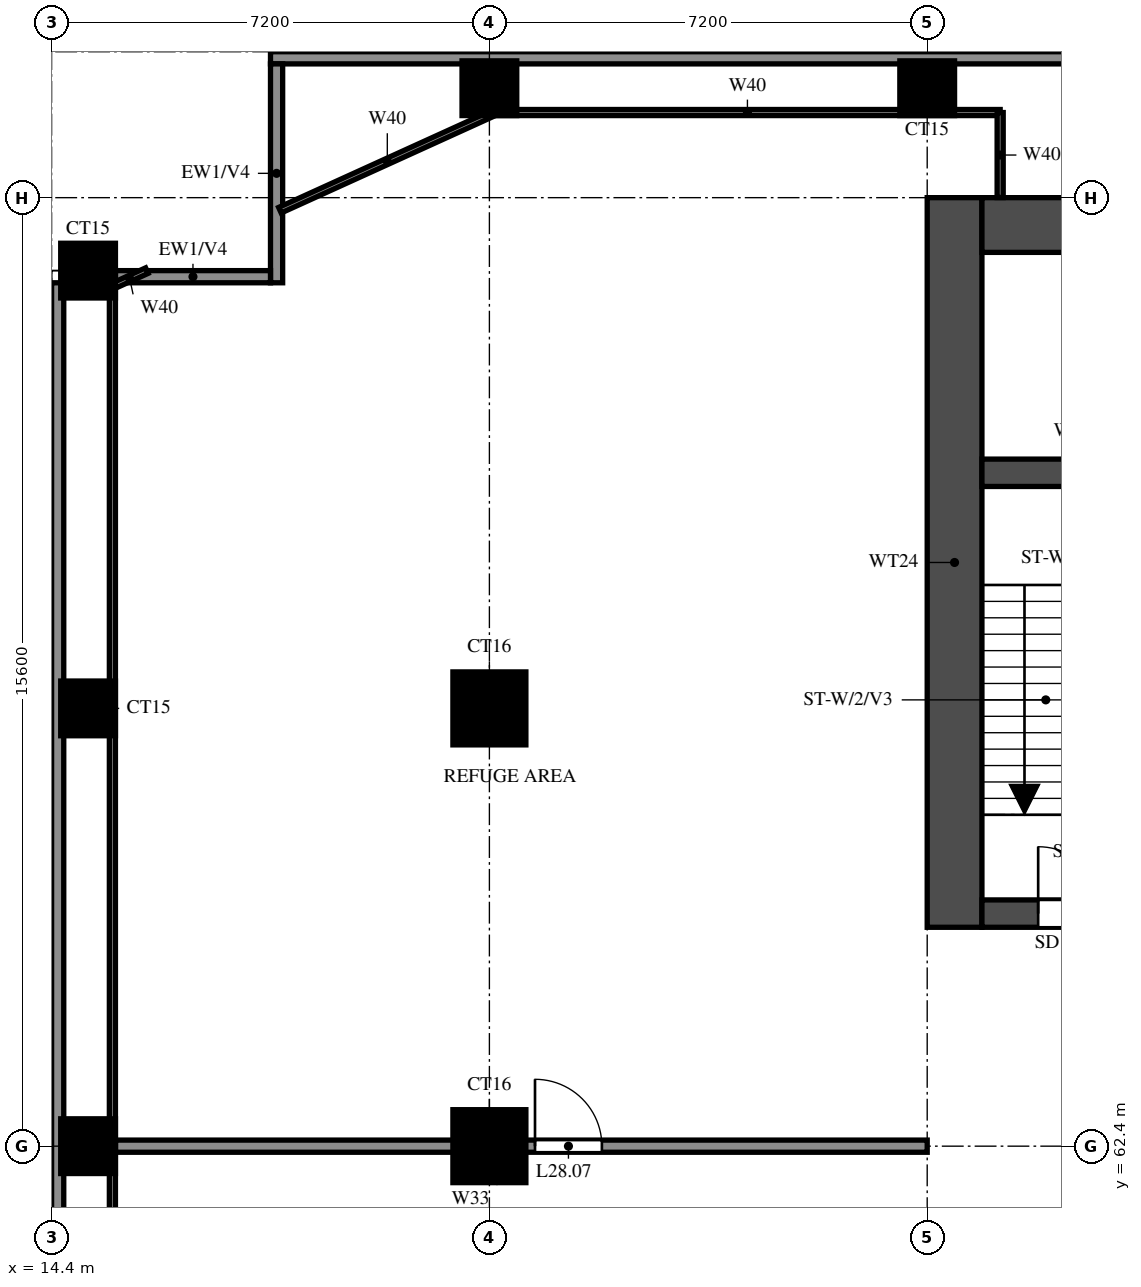
"""IFC4 building model, lengths in metres.
Left out: names, types, materials, properties, quantities, classifications, styles, units other than length and angle.
Written with IfcOpenShell. Run it as: python <this file> out.ifc"""

import sys

from ifc_helpers import new_model, si_unit, direction, frame, frame_2d, origin, origin_2d, place, context, subcontext, project, spatial, rectangle, extrude, source, transform, mapped, element, fill, save


model = new_model("IFC4")
c1 = context("Model", 3, precision=1e-05, world=origin(), true_north=direction((0.0, 1.0)))
c2 = subcontext(c1, "Body", "Model", "MODEL_VIEW")
j1 = project(units=[si_unit("LENGTHUNIT", "METRE"), si_unit("PLANEANGLEUNIT", "RADIAN")], contexts=[c1])
p1 = place(None, origin())
s1 = spatial("IfcSite", under=j1, at=p1, CompositionType="ELEMENT")
p2 = place(p1, origin())
s2 = spatial("IfcBuilding", under=s1, at=p2, CompositionType="ELEMENT")
p3 = place(p2, frame((0.0, 0.0, 107.5)))
s3 = spatial("IfcBuildingStorey", under=s2, at=p3, CompositionType="ELEMENT", Elevation=107.5)
m1 = source(origin(), c2, "Body", "SweptSolid", [
    extrude(rectangle(XDim=0.9, YDim=0.9, at=origin_2d()), origin(), (0.0, 0.0, 1.0), 5.2),
])
p4 = place(p3, frame((15.0, 62.4, 0.0), z_axis=(0.0, 0.0, 1.0), x_axis=(1.0, 0.0, 0.0)))
e1 = element("IfcColumn", 1, at=p4, inside=s3, PredefinedType="COLUMN", context=c2, shape_type="MappedRepresentation", body=[
    mapped(m1, transform((0.0, 0.0, 0.0))),
])
m2 = source(origin(), c2, "Body", "SweptSolid", [
    extrude(rectangle(XDim=1.2, YDim=1.2, at=origin_2d()), origin(), (0.0, 0.0, 1.0), 5.2),
])
p5 = place(p3, frame((21.6, 62.4, 0.0), z_axis=(0.0, 0.0, 1.0), x_axis=(1.0, 0.0, 0.0)))
e2 = element("IfcColumn", 2, at=p5, inside=s3, PredefinedType="COLUMN", context=c2, shape_type="MappedRepresentation", body=[
    mapped(m2, transform((0.0, 0.0, 0.0))),
])
p6 = place(p3, frame((15.0, 69.6, 0.0), z_axis=(0.0, 0.0, 1.0), x_axis=(1.0, 0.0, 0.0)))
e3 = element("IfcColumn", 3, at=p6, inside=s3, PredefinedType="COLUMN", context=c2, shape_type="MappedRepresentation", body=[
    mapped(m1, transform((0.0, 0.0, 0.0))),
])
p7 = place(p3, frame((21.6, 69.6, 0.0), z_axis=(0.0, 0.0, 1.0), x_axis=(1.0, 0.0, 0.0)))
e4 = element("IfcColumn", 4, at=p7, inside=s3, PredefinedType="COLUMN", context=c2, shape_type="MappedRepresentation", body=[
    mapped(m2, transform((0.0, 0.0, 0.0))),
])
for number, where, z_axis, x_axis in (
    (5, (15.0, 76.8, 0.0), (0.0, 0.0, 1.0), (1.0, 0.0, 0.0)),
    (6, (21.6, 79.8, 0.0), (0.0, 0.0, 1.0), (1.0, 0.0, 0.0)),
    (7, (28.8, 79.8, 0.0), (0.0, 0.0, 1.0), (1.0, 0.0, 0.0)),
):
    element("IfcColumn", number, at=place(p3, frame(where, z_axis=z_axis, x_axis=x_axis)), inside=s3, PredefinedType="COLUMN", context=c2, shape_type="MappedRepresentation", body=[
        mapped(m1, transform((0.0, 0.0, 0.0))),
    ])
p8 = place(p3, frame((29.25, 66.0, 0.0), z_axis=(0.0, 0.0, 1.0), x_axis=(0.0, 1.0, 0.0)))
e8 = element("IfcWall", 8, at=p8, inside=s3, PredefinedType="SHEAR", context=c2, shape_type="SweptSolid", body=[
    extrude(rectangle(XDim=12.0, YDim=0.9, at=frame_2d((6.0, 0.0))), origin(), (0.0, 0.0, 1.0), 5.2),
])
p9 = place(p3, frame((29.7, 77.55, 0.0), z_axis=(0.0, 0.0, 1.0), x_axis=(1.0, 0.0, 0.0)))
e9 = element("IfcWall", 9, at=p9, inside=s3, PredefinedType="SHEAR", context=c2, shape_type="SweptSolid", body=[
    extrude(rectangle(XDim=41.4, YDim=0.9, at=frame_2d((20.7, 0.0))), origin(), (0.0, 0.0, 1.0), 5.2),
])
p10 = place(p3, frame((29.7, 66.225, 0.0), z_axis=(0.0, 0.0, 1.0), x_axis=(1.0, 0.0, 0.0)))
e10 = element("IfcWall", 10, at=p10, inside=s3, PredefinedType="SHEAR", context=c2, shape_type="SweptSolid", body=[
    extrude(rectangle(XDim=41.4, YDim=0.45, at=frame_2d((20.7, 0.0))), origin(), (0.0, 0.0, 1.0), 5.2),
])
p11 = place(p10, frame((0.925, 0.0, 0.0)))
e11 = element("IfcOpeningElement", 11, at=p11, cuts=e10, PredefinedType="OPENING", context=c2, shape_type="SweptSolid", body=[
    extrude(rectangle(XDim=1.1, YDim=2.1, at=frame_2d((0.55, 1.05))), frame((0.0, 0.235, 0.0), z_axis=(0.0, -1.0, 0.0), x_axis=(1.0, 0.0, 0.0)), (0.0, 0.0, 1.0), 0.47),
])
p12 = place(p10, frame((3.738, 0.0, 0.0)))
e12 = element("IfcOpeningElement", 12, at=p12, cuts=e10, PredefinedType="OPENING", context=c2, shape_type="SweptSolid", body=[
    extrude(rectangle(XDim=1.8, YDim=2.1, at=frame_2d((0.9, 1.05))), frame((0.0, 0.235, 0.0), z_axis=(0.0, -1.0, 0.0), x_axis=(1.0, 0.0, 0.0)), (0.0, 0.0, 1.0), 0.47),
])
p13 = place(p3, frame((29.7, 73.475, 0.0), z_axis=(0.0, 0.0, 1.0), x_axis=(1.0, 0.0, 0.0)))
e13 = element("IfcWall", 13, at=p13, inside=s3, PredefinedType="SHEAR", context=c2, shape_type="SweptSolid", body=[
    extrude(rectangle(XDim=3.175, YDim=0.45, at=frame_2d((1.587, 0.0))), origin(), (0.0, 0.0, 1.0), 5.2),
])
p14 = place(p3, frame((82.6, 80.3, 0.0), z_axis=(0.0, 0.0, 1.0), x_axis=(-1.0, 0.0, 0.0)))
e14 = element("IfcWall", 14, at=p14, inside=s3, PredefinedType="SOLIDWALL", context=c2, shape_type="SweptSolid", body=[
    extrude(rectangle(XDim=64.6, YDim=0.2, at=frame_2d((32.3, 0.0))), origin(), (0.0, 0.0, 1.0), 5.2),
])
p15 = place(p3, frame((18.1, 80.2, 0.0), z_axis=(0.0, 0.0, 1.0), x_axis=(0.0, -1.0, 0.0)))
e15 = element("IfcWall", 15, at=p15, inside=s3, PredefinedType="SOLIDWALL", context=c2, shape_type="SweptSolid", body=[
    extrude(rectangle(XDim=3.6, YDim=0.2, at=frame_2d((1.8, 0.0))), origin(), (0.0, 0.0, 1.0), 5.2),
])
p16 = place(p3, frame((18.0, 76.7, 0.0), z_axis=(0.0, 0.0, 1.0), x_axis=(-1.0, 0.0, 0.0)))
e16 = element("IfcWall", 16, at=p16, inside=s3, PredefinedType="SOLIDWALL", context=c2, shape_type="SweptSolid", body=[
    extrude(rectangle(XDim=2.55, YDim=0.2, at=frame_2d((1.275, 0.0))), origin(), (0.0, 0.0, 1.0), 5.2),
])
p17 = place(p3, frame((14.5, 76.6, 0.0), z_axis=(0.0, 0.0, 1.0), x_axis=(0.0, -1.0, 0.0)))
e17 = element("IfcWall", 17, at=p17, inside=s3, PredefinedType="SOLIDWALL", context=c2, shape_type="SweptSolid", body=[
    extrude(rectangle(XDim=39.4, YDim=0.2, at=frame_2d((19.7, 0.0))), origin(), (0.0, 0.0, 1.0), 5.2),
])
p18 = place(p3, frame((15.45, 62.4, 0.0), z_axis=(0.0, 0.0, 1.0), x_axis=(1.0, 0.0, 0.0)))
e18 = element("IfcWall", 18, at=p18, inside=s3, PredefinedType="SOLIDWALL", context=c2, shape_type="SweptSolid", body=[
    extrude(rectangle(XDim=13.35, YDim=0.2, at=frame_2d((6.675, 0.0))), origin(), (0.0, 0.0, 1.0), 5.2),
])
p19 = place(p18, frame((6.9, 0.0, 0.0)))
e19 = element("IfcOpeningElement", 19, at=p19, cuts=e18, PredefinedType="OPENING", context=c2, shape_type="SweptSolid", body=[
    extrude(rectangle(XDim=1.1, YDim=2.1, at=frame_2d((0.55, 1.05))), frame((0.0, 0.11, 0.0), z_axis=(0.0, -1.0, 0.0), x_axis=(1.0, 0.0, 0.0)), (0.0, 0.0, 1.0), 0.22),
])
p20 = place(p3, frame((21.687, 79.4, 0.0), z_axis=(0.0, 0.0, 1.0), x_axis=(1.0, 0.0, 0.0)))
e20 = element("IfcWall", 20, at=p20, inside=s3, PredefinedType="PARTITIONING", context=c2, shape_type="SweptSolid", body=[
    extrude(rectangle(XDim=8.313, YDim=0.1, at=frame_2d((4.156, 0.0))), origin(), (0.0, 0.0, 1.0), 5.2),
])
p21 = place(p3, frame((15.4, 40.8, 0.0), z_axis=(0.0, 0.0, 1.0), x_axis=(0.0, 1.0, 0.0)))
e21 = element("IfcWall", 21, at=p21, inside=s3, PredefinedType="PARTITIONING", context=c2, shape_type="SweptSolid", body=[
    extrude(rectangle(XDim=35.742, YDim=0.1, at=frame_2d((17.871, 0.0))), origin(), (0.0, 0.0, 1.0), 5.2),
])
p22 = place(p3, frame((30.0, 78.002, 0.0), z_axis=(0.0, 0.0, 1.0), x_axis=(0.0, 1.0, 0.0)))
e22 = element("IfcWall", 22, at=p22, inside=s3, PredefinedType="PARTITIONING", context=c2, shape_type="SweptSolid", body=[
    extrude(rectangle(XDim=1.398, YDim=0.1, at=frame_2d((0.699, 0.0))), origin(), (0.0, 0.0, 1.0), 5.2),
])
p23 = place(p3, frame((15.967, 76.8, 0.0), z_axis=(0.0, 0.0, 1.0), x_axis=(-0.910205385289, -0.41415716412, 0.0)))
e23 = element("IfcWall", 23, at=p23, inside=s3, PredefinedType="PARTITIONING", context=c2, shape_type="SweptSolid", body=[
    extrude(rectangle(XDim=0.623, YDim=0.1, at=frame_2d((0.312, 0.0))), origin(), (0.0, 0.0, 1.0), 5.2),
])
p24 = place(p3, frame((21.687, 79.4, 0.0), z_axis=(0.0, 0.0, 1.0), x_axis=(-0.910316907758, -0.413911980316, 0.0)))
e24 = element("IfcWall", 24, at=p24, inside=s3, PredefinedType="PARTITIONING", context=c2, shape_type="SweptSolid", body=[
    extrude(rectangle(XDim=3.88, YDim=0.1, at=frame_2d((1.94, 0.0))), origin(), (0.0, 0.0, 1.0), 5.2),
])
p25 = place(p11, origin())
e25 = element("IfcDoor", 25, at=p25, inside=s3, OperationType="SINGLE_SWING_LEFT", PredefinedType="DOOR", context=c2, shape_type="SweptSolid", body=[
    extrude(rectangle(XDim=1.1, YDim=2.1, at=frame_2d((0.55, 1.05))), frame((0.0, 0.025, 0.0), z_axis=(0.0, -1.0, 0.0), x_axis=(1.0, 0.0, 0.0)), (0.0, 0.0, 1.0), 0.05),
])
fill(e11, e25)
p26 = place(p19, origin())
e26 = element("IfcDoor", 26, at=p26, inside=s3, OperationType="SINGLE_SWING_RIGHT", PredefinedType="DOOR", context=c2, shape_type="SweptSolid", body=[
    extrude(rectangle(XDim=1.1, YDim=2.1, at=frame_2d((0.55, 1.05))), frame((0.0, 0.025, 0.0), z_axis=(0.0, -1.0, 0.0), x_axis=(1.0, 0.0, 0.0)), (0.0, 0.0, 1.0), 0.05),
])
fill(e19, e26)
save(model, sys.argv[1])
